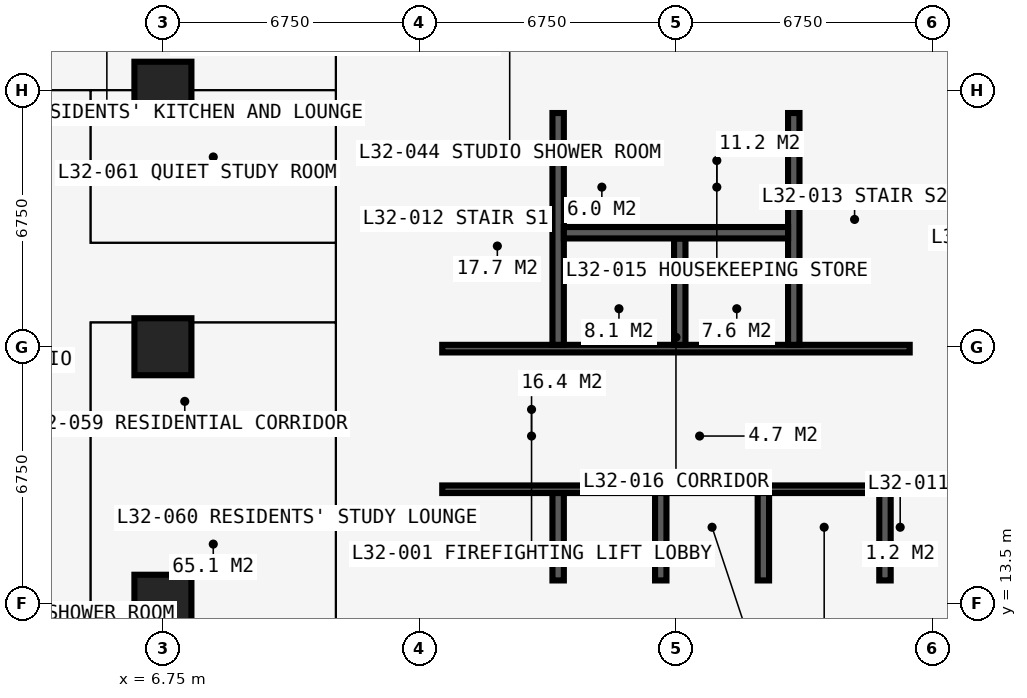
"""IFC4 building model, lengths in metres.
Left out: names, types, materials, properties, quantities, classifications, styles, units other than length and angle.
Written with IfcOpenShell. Run it as: python <this file> out.ifc"""

import sys

from ifc_helpers import new_model, si_unit, direction, frame, frame_2d, origin, origin_2d, place, context, subcontext, project, spatial, rectangle, extrude, element, fill, save


model = new_model("IFC4")
c1 = context("Model", 3, precision=1e-05, world=origin(), true_north=direction((0.0, 1.0)))
c2 = subcontext(c1, "Body", "Model", "MODEL_VIEW")
j1 = project(units=[si_unit("LENGTHUNIT", "METRE"), si_unit("PLANEANGLEUNIT", "RADIAN")], contexts=[c1])
p1 = place(None, origin())
s1 = spatial("IfcSite", under=j1, at=p1, CompositionType="ELEMENT")
p2 = place(p1, origin())
s2 = spatial("IfcBuilding", under=s1, at=p2, CompositionType="ELEMENT")
p3 = place(p2, frame((0.0, 0.0, 119.7)))
s3 = spatial("IfcBuildingStorey", under=s2, at=p3, CompositionType="ELEMENT", Elevation=119.7)
for number, where, z_axis, x_axis in (
    (1, (6.75, 13.5, 0.0), (0.0, 0.0, 1.0), (1.0, 0.0, 0.0)),
    (2, (6.75, 20.25, 0.0), (0.0, 0.0, 1.0), (1.0, 0.0, 0.0)),
    (3, (6.75, 27.0, 0.0), (0.0, 0.0, 1.0), (1.0, 0.0, 0.0)),
):
    element("IfcColumn", number, at=place(p3, frame(where, z_axis=z_axis, x_axis=x_axis)), inside=s3, PredefinedType="COLUMN", context=c2, shape_type="SweptSolid", body=[
        extrude(rectangle(XDim=1.5, YDim=1.5, at=origin_2d()), origin(), (0.0, 0.0, 1.0), 3.6),
    ])
p4 = place(p3, frame((12.9, 13.5, 0.0), z_axis=(0.0, 0.0, 1.0), x_axis=(1.0, 0.0, 0.0)))
e4 = element("IfcWall", 4, at=p4, inside=s3, PredefinedType="SHEAR", context=c2, shape_type="SweptSolid", body=[
    extrude(rectangle(XDim=14.7, YDim=1.2, at=frame_2d((7.35, 0.0))), origin(), (0.0, 0.0, 1.0), 3.6),
])
p5 = place(p3, frame((27.0, 14.1, 0.0), z_axis=(0.0, 0.0, 1.0), x_axis=(0.0, 1.0, 0.0)))
e5 = element("IfcWall", 5, at=p5, inside=s3, PredefinedType="SHEAR", context=c2, shape_type="SweptSolid", body=[
    extrude(rectangle(XDim=12.3, YDim=1.2, at=frame_2d((6.15, 0.0))), origin(), (0.0, 0.0, 1.0), 3.6),
])
p6 = place(p5, frame((3.65, 0.0, 0.0)))
e6 = element("IfcOpeningElement", 6, at=p6, cuts=e5, PredefinedType="OPENING", context=c2, shape_type="SweptSolid", body=[
    extrude(rectangle(XDim=1.2, YDim=2.2, at=frame_2d((0.6, 1.1))), frame((0.0, 0.61, 0.0), z_axis=(0.0, -1.0, 0.0), x_axis=(1.0, 0.0, 0.0)), (0.0, 0.0, 1.0), 1.22),
])
p7 = place(p3, frame((27.6, 27.0, 0.0), z_axis=(0.0, 0.0, 1.0), x_axis=(-1.0, 0.0, 0.0)))
e7 = element("IfcWall", 7, at=p7, inside=s3, PredefinedType="SHEAR", context=c2, shape_type="SweptSolid", body=[
    extrude(rectangle(XDim=14.7, YDim=1.2, at=frame_2d((7.35, 0.0))), origin(), (0.0, 0.0, 1.0), 3.6),
])
p8 = place(p7, frame((5.225, 0.0, 0.0)))
e8 = element("IfcOpeningElement", 8, at=p8, cuts=e7, PredefinedType="OPENING", context=c2, shape_type="SweptSolid", body=[
    extrude(rectangle(XDim=0.9, YDim=2.2, at=frame_2d((0.45, 1.1))), frame((0.0, 0.61, 0.0), z_axis=(0.0, -1.0, 0.0), x_axis=(1.0, 0.0, 0.0)), (0.0, 0.0, 1.0), 1.22),
])
p9 = place(p7, frame((8.2, 0.0, 0.0)))
e9 = element("IfcOpeningElement", 9, at=p9, cuts=e7, PredefinedType="OPENING", context=c2, shape_type="SweptSolid", body=[
    extrude(rectangle(XDim=1.0, YDim=2.2, at=frame_2d((0.5, 1.1))), frame((0.0, 0.61, 0.0), z_axis=(0.0, -1.0, 0.0), x_axis=(1.0, 0.0, 0.0)), (0.0, 0.0, 1.0), 1.22),
])
p10 = place(p3, frame((13.5, 26.4, 0.0), z_axis=(0.0, 0.0, 1.0), x_axis=(0.0, -1.0, 0.0)))
e10 = element("IfcWall", 10, at=p10, inside=s3, PredefinedType="SHEAR", context=c2, shape_type="SweptSolid", body=[
    extrude(rectangle(XDim=12.3, YDim=1.2, at=frame_2d((6.15, 0.0))), origin(), (0.0, 0.0, 1.0), 3.6),
])
p11 = place(p10, frame((7.45, 0.0, 0.0)))
e11 = element("IfcOpeningElement", 11, at=p11, cuts=e10, PredefinedType="OPENING", context=c2, shape_type="SweptSolid", body=[
    extrude(rectangle(XDim=1.2, YDim=2.2, at=frame_2d((0.6, 1.1))), frame((0.0, 0.61, 0.0), z_axis=(0.0, -1.0, 0.0), x_axis=(1.0, 0.0, 0.0)), (0.0, 0.0, 1.0), 1.22),
])
p12 = place(p3, frame((14.1, 16.5, 0.0), z_axis=(0.0, 0.0, 1.0), x_axis=(1.0, 0.0, 0.0)))
e12 = element("IfcWall", 12, at=p12, inside=s3, PredefinedType="SHEAR", context=c2, shape_type="SweptSolid", body=[
    extrude(rectangle(XDim=12.3, YDim=0.2, at=frame_2d((6.15, 0.0))), origin(), (0.0, 0.0, 1.0), 3.6),
])
p13 = place(p12, frame((0.9, 0.0, 0.0)))
e13 = element("IfcOpeningElement", 13, at=p13, cuts=e12, PredefinedType="OPENING", context=c2, shape_type="SweptSolid", body=[
    extrude(rectangle(XDim=1.1, YDim=2.2, at=frame_2d((0.55, 1.1))), frame((0.0, 0.11, 0.0), z_axis=(0.0, -1.0, 0.0), x_axis=(1.0, 0.0, 0.0)), (0.0, 0.0, 1.0), 0.22),
])
p14 = place(p12, frame((9.5, 0.0, 0.0)))
e14 = element("IfcOpeningElement", 14, at=p14, cuts=e12, PredefinedType="OPENING", context=c2, shape_type="SweptSolid", body=[
    extrude(rectangle(XDim=1.1, YDim=2.2, at=frame_2d((0.55, 1.1))), frame((0.0, 0.11, 0.0), z_axis=(0.0, -1.0, 0.0), x_axis=(1.0, 0.0, 0.0)), (0.0, 0.0, 1.0), 0.22),
])
p15 = place(p3, frame((14.1, 20.2, 0.0), z_axis=(0.0, 0.0, 1.0), x_axis=(1.0, 0.0, 0.0)))
e15 = element("IfcWall", 15, at=p15, inside=s3, PredefinedType="SHEAR", context=c2, shape_type="SweptSolid", body=[
    extrude(rectangle(XDim=12.3, YDim=0.2, at=frame_2d((6.15, 0.0))), origin(), (0.0, 0.0, 1.0), 3.6),
])
p16 = place(p15, frame((0.35, 0.0, 0.0)))
e16 = element("IfcOpeningElement", 16, at=p16, cuts=e15, PredefinedType="OPENING", context=c2, shape_type="SweptSolid", body=[
    extrude(rectangle(XDim=1.1, YDim=2.2, at=frame_2d((0.55, 1.1))), frame((0.0, 0.11, 0.0), z_axis=(0.0, -1.0, 0.0), x_axis=(1.0, 0.0, 0.0)), (0.0, 0.0, 1.0), 0.22),
])
p17 = place(p15, frame((9.75, 0.0, 0.0)))
e17 = element("IfcOpeningElement", 17, at=p17, cuts=e15, PredefinedType="OPENING", context=c2, shape_type="SweptSolid", body=[
    extrude(rectangle(XDim=1.1, YDim=2.2, at=frame_2d((0.55, 1.1))), frame((0.0, 0.11, 0.0), z_axis=(0.0, -1.0, 0.0), x_axis=(1.0, 0.0, 0.0)), (0.0, 0.0, 1.0), 0.22),
])
for number, where, z_axis, x_axis in (
    (18, (17.15, 20.3, 0.0), (0.0, 0.0, 1.0), (0.0, 1.0, 0.0)),
    (19, (23.35, 20.3, 0.0), (0.0, 0.0, 1.0), (0.0, 1.0, 0.0)),
):
    element("IfcWall", number, at=place(p3, frame(where, z_axis=z_axis, x_axis=x_axis)), inside=s3, PredefinedType="SHEAR", context=c2, shape_type="SweptSolid", body=[
        extrude(rectangle(XDim=6.1, YDim=0.3, at=frame_2d((3.05, 0.0))), origin(), (0.0, 0.0, 1.0), 3.6),
    ])
p18 = place(p3, frame((20.35, 20.3, 0.0), z_axis=(0.0, 0.0, 1.0), x_axis=(0.0, 1.0, 0.0)))
e20 = element("IfcWall", 20, at=p18, inside=s3, PredefinedType="SHEAR", context=c2, shape_type="SweptSolid", body=[
    extrude(rectangle(XDim=2.8, YDim=0.3, at=frame_2d((1.4, 0.0))), origin(), (0.0, 0.0, 1.0), 3.6),
])
p19 = place(p3, frame((17.3, 23.25, 0.0), z_axis=(0.0, 0.0, 1.0), x_axis=(1.0, 0.0, 0.0)))
e21 = element("IfcWall", 21, at=p19, inside=s3, PredefinedType="SHEAR", context=c2, shape_type="SweptSolid", body=[
    extrude(rectangle(XDim=5.9, YDim=0.3, at=frame_2d((2.95, 0.0))), origin(), (0.0, 0.0, 1.0), 3.6),
])
for number, where, z_axis, x_axis in (
    (22, (17.15, 14.1, 0.0), (0.0, 0.0, 1.0), (0.0, 1.0, 0.0)),
    (23, (19.85, 14.1, 0.0), (0.0, 0.0, 1.0), (0.0, 1.0, 0.0)),
    (24, (22.55, 14.1, 0.0), (0.0, 0.0, 1.0), (0.0, 1.0, 0.0)),
    (25, (25.75, 14.1, 0.0), (0.0, 0.0, 1.0), (0.0, 1.0, 0.0)),
):
    element("IfcWall", number, at=place(p3, frame(where, z_axis=z_axis, x_axis=x_axis)), inside=s3, PredefinedType="SHEAR", context=c2, shape_type="SweptSolid", body=[
        extrude(rectangle(XDim=2.3, YDim=0.3, at=frame_2d((1.15, 0.0))), origin(), (0.0, 0.0, 1.0), 3.6),
    ])
p20 = place(p3, frame((18.875, 16.6, 0.0), z_axis=(0.0, 0.0, 1.0), x_axis=(0.0, 1.0, 0.0)))
e26 = element("IfcWall", 26, at=p20, inside=s3, PredefinedType="PARTITIONING", context=c2, shape_type="SweptSolid", body=[
    extrude(rectangle(XDim=3.5, YDim=0.15, at=frame_2d((1.75, 0.0))), origin(), (0.0, 0.0, 1.0), 3.375),
])
p21 = place(p20, frame((1.15, 0.0, 0.0)))
e27 = element("IfcOpeningElement", 27, at=p21, cuts=e26, PredefinedType="OPENING", context=c2, shape_type="SweptSolid", body=[
    extrude(rectangle(XDim=1.2, YDim=2.2, at=frame_2d((0.6, 1.1))), frame((0.0, 0.085, 0.0), z_axis=(0.0, -1.0, 0.0), x_axis=(1.0, 0.0, 0.0)), (0.0, 0.0, 1.0), 0.17),
])
p22 = place(p3, frame((21.625, 16.6, 0.0), z_axis=(0.0, 0.0, 1.0), x_axis=(0.0, 1.0, 0.0)))
e28 = element("IfcWall", 28, at=p22, inside=s3, PredefinedType="PARTITIONING", context=c2, shape_type="SweptSolid", body=[
    extrude(rectangle(XDim=3.5, YDim=0.15, at=frame_2d((1.75, 0.0))), origin(), (0.0, 0.0, 1.0), 3.375),
])
p23 = place(p22, frame((1.15, 0.0, 0.0)))
e29 = element("IfcOpeningElement", 29, at=p23, cuts=e28, PredefinedType="OPENING", context=c2, shape_type="SweptSolid", body=[
    extrude(rectangle(XDim=1.2, YDim=2.2, at=frame_2d((0.6, 1.1))), frame((0.0, 0.085, 0.0), z_axis=(0.0, -1.0, 0.0), x_axis=(1.0, 0.0, 0.0)), (0.0, 0.0, 1.0), 0.17),
])
p24 = place(p3, frame((20.12, 16.6, 0.0), z_axis=(0.0, 0.0, 1.0), x_axis=(0.0, 1.0, 0.0)))
e30 = element("IfcWall", 30, at=p24, inside=s3, PredefinedType="PARTITIONING", context=c2, shape_type="SweptSolid", body=[
    extrude(rectangle(XDim=3.5, YDim=0.15, at=frame_2d((1.75, 0.0))), origin(), (0.0, 0.0, 1.0), 3.375),
])
p25 = place(p3, frame((19.375, 23.4, 0.0), z_axis=(0.0, 0.0, 1.0), x_axis=(0.0, 1.0, 0.0)))
e31 = element("IfcWall", 31, at=p25, inside=s3, PredefinedType="PARTITIONING", context=c2, shape_type="SweptSolid", body=[
    extrude(rectangle(XDim=3.0, YDim=0.15, at=frame_2d((1.5, 0.0))), origin(), (0.0, 0.0, 1.0), 3.375),
])
p26 = place(p3, frame((3.35, 27.0, 0.0), z_axis=(0.0, 0.0, 1.0), x_axis=(1.0, 0.0, 0.0)))
e32 = element("IfcWall", 32, at=p26, inside=s3, PredefinedType="PARTITIONING", context=c2, shape_type="SweptSolid", body=[
    extrude(rectangle(XDim=7.95, YDim=0.15, at=frame_2d((3.975, 0.0))), origin(), (0.0, 0.0, 1.0), 2.806),
])
p27 = place(p3, frame((4.85, 12.775, 0.0), z_axis=(0.0, 0.0, 1.0), x_axis=(0.0, 1.0, 0.0)))
e33 = element("IfcWall", 33, at=p27, inside=s3, PredefinedType="PARTITIONING", context=c2, shape_type="SweptSolid", body=[
    extrude(rectangle(XDim=8.113, YDim=0.15, at=frame_2d((4.056, 0.0))), origin(), (0.0, 0.0, 1.0), 3.375),
])
p28 = place(p27, frame((3.6, 0.0, 0.0)))
e34 = element("IfcOpeningElement", 34, at=p28, cuts=e33, PredefinedType="OPENING", context=c2, shape_type="SweptSolid", body=[
    extrude(rectangle(XDim=0.95, YDim=2.2, at=frame_2d((0.475, 1.1))), frame((0.0, 0.085, 0.0), z_axis=(0.0, -1.0, 0.0), x_axis=(1.0, 0.0, 0.0)), (0.0, 0.0, 1.0), 0.17),
])
p29 = place(p3, frame((4.85, 20.887, 0.0), z_axis=(0.0, 0.0, 1.0), x_axis=(1.0, 0.0, 0.0)))
e35 = element("IfcWall", 35, at=p29, inside=s3, PredefinedType="PARTITIONING", context=c2, shape_type="SweptSolid", body=[
    extrude(rectangle(XDim=6.45, YDim=0.15, at=frame_2d((3.225, 0.0))), origin(), (0.0, 0.0, 1.0), 3.375),
])
p30 = place(p3, frame((4.85, 22.988, 0.0), z_axis=(0.0, 0.0, 1.0), x_axis=(0.0, 1.0, 0.0)))
e36 = element("IfcWall", 36, at=p30, inside=s3, PredefinedType="PARTITIONING", context=c2, shape_type="SweptSolid", body=[
    extrude(rectangle(XDim=4.012, YDim=0.15, at=frame_2d((2.006, 0.0))), origin(), (0.0, 0.0, 1.0), 3.375),
])
p31 = place(p3, frame((4.85, 22.988, 0.0), z_axis=(0.0, 0.0, 1.0), x_axis=(1.0, 0.0, 0.0)))
e37 = element("IfcWall", 37, at=p31, inside=s3, PredefinedType="PARTITIONING", context=c2, shape_type="SweptSolid", body=[
    extrude(rectangle(XDim=6.45, YDim=0.15, at=frame_2d((3.225, 0.0))), origin(), (0.0, 0.0, 1.0), 3.375),
])
p32 = place(p31, frame((2.75, 0.0, 0.0)))
e38 = element("IfcOpeningElement", 38, at=p32, cuts=e37, PredefinedType="OPENING", context=c2, shape_type="SweptSolid", body=[
    extrude(rectangle(XDim=0.95, YDim=2.2, at=frame_2d((0.475, 1.1))), frame((0.0, 0.085, 0.0), z_axis=(0.0, -1.0, 0.0), x_axis=(1.0, 0.0, 0.0)), (0.0, 0.0, 1.0), 0.17),
])
p33 = place(p3, frame((11.3, 11.3, 0.0), z_axis=(0.0, 0.0, 1.0), x_axis=(0.0, 1.0, 0.0)))
e39 = element("IfcWall", 39, at=p33, inside=s3, PredefinedType="PARTITIONING", context=c2, shape_type="SweptSolid", body=[
    extrude(rectangle(XDim=19.3, YDim=0.15, at=frame_2d((9.65, 0.0))), origin(), (0.0, 0.0, 1.0), 3.375),
])
p34 = place(p33, frame((18.1, 0.0, 0.0)))
e40 = element("IfcOpeningElement", 40, at=p34, cuts=e39, PredefinedType="OPENING", context=c2, shape_type="SweptSolid", body=[
    extrude(rectangle(XDim=1.0, YDim=2.2, at=frame_2d((0.5, 1.1))), frame((0.0, 0.085, 0.0), z_axis=(0.0, -1.0, 0.0), x_axis=(1.0, 0.0, 0.0)), (0.0, 0.0, 1.0), 0.17),
])
p35 = place(p33, frame((10.137, 0.0, 0.0)))
e41 = element("IfcOpeningElement", 41, at=p35, cuts=e39, PredefinedType="OPENING", context=c2, shape_type="SweptSolid", body=[
    extrude(rectangle(XDim=1.0, YDim=2.2, at=frame_2d((0.5, 1.1))), frame((0.0, 0.085, 0.0), z_axis=(0.0, -1.0, 0.0), x_axis=(1.0, 0.0, 0.0)), (0.0, 0.0, 1.0), 0.17),
])
p36 = place(p13, origin())
e42 = element("IfcDoor", 42, at=p36, inside=s3, OperationType="DOUBLE_DOOR_SLIDING", PredefinedType="DOOR", context=c2, shape_type="SweptSolid", body=[
    extrude(rectangle(XDim=1.1, YDim=2.2, at=frame_2d((0.55, 1.1))), frame((0.0, 0.025, 0.0), z_axis=(0.0, -1.0, 0.0), x_axis=(1.0, 0.0, 0.0)), (0.0, 0.0, 1.0), 0.05),
])
fill(e13, e42)
p37 = place(p14, origin())
e43 = element("IfcDoor", 43, at=p37, inside=s3, OperationType="DOUBLE_DOOR_SLIDING", PredefinedType="DOOR", context=c2, shape_type="SweptSolid", body=[
    extrude(rectangle(XDim=1.1, YDim=2.2, at=frame_2d((0.55, 1.1))), frame((0.0, 0.025, 0.0), z_axis=(0.0, -1.0, 0.0), x_axis=(1.0, 0.0, 0.0)), (0.0, 0.0, 1.0), 0.05),
])
fill(e14, e43)
p38 = place(p11, origin())
e44 = element("IfcDoor", 44, at=p38, inside=s3, OperationType="DOUBLE_DOOR_SINGLE_SWING", PredefinedType="DOOR", context=c2, shape_type="SweptSolid", body=[
    extrude(rectangle(XDim=1.2, YDim=2.2, at=frame_2d((0.6, 1.1))), frame((0.0, 0.025, 0.0), z_axis=(0.0, -1.0, 0.0), x_axis=(1.0, 0.0, 0.0)), (0.0, 0.0, 1.0), 0.05),
])
fill(e11, e44)
p39 = place(p6, origin())
e45 = element("IfcDoor", 45, at=p39, inside=s3, OperationType="DOUBLE_DOOR_SINGLE_SWING", PredefinedType="DOOR", context=c2, shape_type="SweptSolid", body=[
    extrude(rectangle(XDim=1.2, YDim=2.2, at=frame_2d((0.6, 1.1))), frame((0.0, 0.025, 0.0), z_axis=(0.0, -1.0, 0.0), x_axis=(1.0, 0.0, 0.0)), (0.0, 0.0, 1.0), 0.05),
])
fill(e6, e45)
p40 = place(p21, origin())
e46 = element("IfcDoor", 46, at=p40, inside=s3, OperationType="DOUBLE_DOOR_SINGLE_SWING", PredefinedType="DOOR", context=c2, shape_type="SweptSolid", body=[
    extrude(rectangle(XDim=1.2, YDim=2.2, at=frame_2d((0.6, 1.1))), frame((0.0, 0.025, 0.0), z_axis=(0.0, -1.0, 0.0), x_axis=(1.0, 0.0, 0.0)), (0.0, 0.0, 1.0), 0.05),
])
fill(e27, e46)
p41 = place(p23, origin())
e47 = element("IfcDoor", 47, at=p41, inside=s3, OperationType="DOUBLE_DOOR_SINGLE_SWING", PredefinedType="DOOR", context=c2, shape_type="SweptSolid", body=[
    extrude(rectangle(XDim=1.2, YDim=2.2, at=frame_2d((0.6, 1.1))), frame((0.0, 0.025, 0.0), z_axis=(0.0, -1.0, 0.0), x_axis=(1.0, 0.0, 0.0)), (0.0, 0.0, 1.0), 0.05),
])
fill(e29, e47)
p42 = place(p8, origin())
e48 = element("IfcDoor", 48, at=p42, inside=s3, OperationType="SINGLE_SWING_LEFT", PredefinedType="DOOR", context=c2, shape_type="SweptSolid", body=[
    extrude(rectangle(XDim=0.9, YDim=2.2, at=frame_2d((0.45, 1.1))), frame((0.0, 0.4, 0.0), z_axis=(0.0, -1.0, 0.0), x_axis=(1.0, 0.0, 0.0)), (0.0, 0.0, 1.0), 0.8),
])
fill(e8, e48)
p43 = place(p9, origin())
e49 = element("IfcDoor", 49, at=p43, inside=s3, OperationType="SINGLE_SWING_LEFT", PredefinedType="DOOR", context=c2, shape_type="SweptSolid", body=[
    extrude(rectangle(XDim=1.0, YDim=2.2, at=frame_2d((0.5, 1.1))), frame((0.0, 0.025, 0.0), z_axis=(0.0, -1.0, 0.0), x_axis=(1.0, 0.0, 0.0)), (0.0, 0.0, 1.0), 0.05),
])
fill(e9, e49)
p44 = place(p16, origin())
e50 = element("IfcDoor", 50, at=p44, inside=s3, OperationType="SINGLE_SWING_LEFT", PredefinedType="DOOR", context=c2, shape_type="SweptSolid", body=[
    extrude(rectangle(XDim=1.1, YDim=2.2, at=frame_2d((0.55, 1.1))), frame((0.0, 0.025, 0.0), z_axis=(0.0, -1.0, 0.0), x_axis=(1.0, 0.0, 0.0)), (0.0, 0.0, 1.0), 0.05),
])
fill(e16, e50)
p45 = place(p17, origin())
e51 = element("IfcDoor", 51, at=p45, inside=s3, OperationType="SINGLE_SWING_LEFT", PredefinedType="DOOR", context=c2, shape_type="SweptSolid", body=[
    extrude(rectangle(XDim=1.1, YDim=2.2, at=frame_2d((0.55, 1.1))), frame((0.0, 0.025, 0.0), z_axis=(0.0, -1.0, 0.0), x_axis=(1.0, 0.0, 0.0)), (0.0, 0.0, 1.0), 0.05),
])
fill(e17, e51)
p46 = place(p35, origin())
e52 = element("IfcDoor", 52, at=p46, inside=s3, OperationType="SINGLE_SWING_LEFT", PredefinedType="DOOR", context=c2, shape_type="SweptSolid", body=[
    extrude(rectangle(XDim=1.0, YDim=2.2, at=frame_2d((0.5, 1.1))), frame((0.0, 0.025, 0.0), z_axis=(0.0, -1.0, 0.0), x_axis=(1.0, 0.0, 0.0)), (0.0, 0.0, 1.0), 0.05),
])
fill(e41, e52)
p47 = place(p28, origin())
e53 = element("IfcDoor", 53, at=p47, inside=s3, OperationType="SINGLE_SWING_LEFT", PredefinedType="DOOR", context=c2, shape_type="SweptSolid", body=[
    extrude(rectangle(XDim=0.95, YDim=2.2, at=frame_2d((0.475, 1.1))), frame((0.0, 0.025, 0.0), z_axis=(0.0, -1.0, 0.0), x_axis=(1.0, 0.0, 0.0)), (0.0, 0.0, 1.0), 0.05),
])
fill(e34, e53)
p48 = place(p32, origin())
e54 = element("IfcDoor", 54, at=p48, inside=s3, OperationType="SINGLE_SWING_LEFT", PredefinedType="DOOR", context=c2, shape_type="SweptSolid", body=[
    extrude(rectangle(XDim=0.95, YDim=2.2, at=frame_2d((0.475, 1.1))), frame((0.0, 0.025, 0.0), z_axis=(0.0, -1.0, 0.0), x_axis=(1.0, 0.0, 0.0)), (0.0, 0.0, 1.0), 0.05),
])
fill(e38, e54)
save(model, sys.argv[1])
